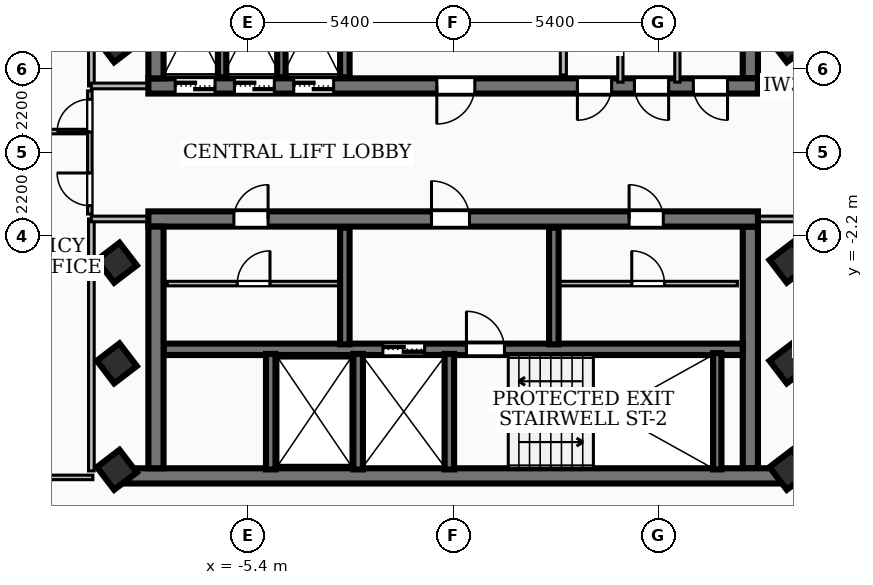
"""IFC4 building model, lengths in metres.
Left out: names, types, materials, properties, quantities, classifications, styles, units other than length and angle.
Written with IfcOpenShell. Run it as: python <this file> out.ifc"""

import sys

from ifc_helpers import new_model, si_unit, direction, frame, frame_2d, origin, origin_2d, place, context, subcontext, project, spatial, rectangle, extrude, element, fill, save


model = new_model("IFC4")
c1 = context("Model", 3, precision=1e-05, world=origin(), true_north=direction((0.0, 1.0)))
c2 = subcontext(c1, "Body", "Model", "MODEL_VIEW")
j1 = project(units=[si_unit("LENGTHUNIT", "METRE"), si_unit("PLANEANGLEUNIT", "RADIAN")], contexts=[c1])
p1 = place(None, origin())
s1 = spatial("IfcSite", under=j1, at=p1, CompositionType="ELEMENT")
p2 = place(p1, origin())
s2 = spatial("IfcBuilding", under=s1, at=p2, CompositionType="ELEMENT")
p3 = place(p2, frame((0.0, 0.0, 229.14)))
s3 = spatial("IfcBuildingStorey", under=s2, at=p3, CompositionType="ELEMENT", Elevation=229.14)
p4 = place(p3, frame((8.02, 1.75, 0.0), z_axis=(0.0, 0.0, 1.0), x_axis=(-1.0, 0.0, 0.0)))
e1 = element("IfcWall", 1, at=p4, inside=s3, PredefinedType="SHEAR", context=c2, shape_type="SweptSolid", body=[
    extrude(rectangle(XDim=16.04, YDim=0.4, at=frame_2d((8.02, 0.0))), origin(), (0.0, 0.0, 1.0), 3.14),
])
p5 = place(p4, frame((7.45, 0.0, 0.0)))
e2 = element("IfcOpeningElement", 2, at=p5, cuts=e1, PredefinedType="OPENING", context=c2, shape_type="SweptSolid", body=[
    extrude(rectangle(XDim=1.0, YDim=2.1, at=frame_2d((0.5, 1.05))), frame((0.0, 0.21, 0.0), z_axis=(0.0, -1.0, 0.0), x_axis=(1.0, 0.0, 0.0)), (0.0, 0.0, 1.0), 0.42),
])
p6 = place(p4, frame((14.285, 0.0, 0.0)))
e3 = element("IfcOpeningElement", 3, at=p6, cuts=e1, PredefinedType="OPENING", context=c2, shape_type="SweptSolid", body=[
    extrude(rectangle(XDim=1.05, YDim=2.15, at=frame_2d((0.525, 1.075))), frame((0.0, 0.21, 0.0), z_axis=(0.0, -1.0, 0.0), x_axis=(1.0, 0.0, 0.0)), (0.0, 0.0, 1.0), 0.42),
])
p7 = place(p4, frame((12.725, 0.0, 0.0)))
e4 = element("IfcOpeningElement", 4, at=p7, cuts=e1, PredefinedType="OPENING", context=c2, shape_type="SweptSolid", body=[
    extrude(rectangle(XDim=1.05, YDim=2.15, at=frame_2d((0.525, 1.075))), frame((0.0, 0.21, 0.0), z_axis=(0.0, -1.0, 0.0), x_axis=(1.0, 0.0, 0.0)), (0.0, 0.0, 1.0), 0.42),
])
p8 = place(p4, frame((11.165, 0.0, 0.0)))
e5 = element("IfcOpeningElement", 5, at=p8, cuts=e1, PredefinedType="OPENING", context=c2, shape_type="SweptSolid", body=[
    extrude(rectangle(XDim=1.05, YDim=2.15, at=frame_2d((0.525, 1.075))), frame((0.0, 0.21, 0.0), z_axis=(0.0, -1.0, 0.0), x_axis=(1.0, 0.0, 0.0)), (0.0, 0.0, 1.0), 0.42),
])
p9 = place(p4, frame((3.85, 0.0, 0.0)))
e6 = element("IfcOpeningElement", 6, at=p9, cuts=e1, PredefinedType="OPENING", context=c2, shape_type="SweptSolid", body=[
    extrude(rectangle(XDim=0.9, YDim=2.06, at=frame_2d((0.45, 1.03))), frame((0.0, 0.21, 0.0), z_axis=(0.0, -1.0, 0.0), x_axis=(1.0, 0.0, 0.0)), (0.0, 0.0, 1.0), 0.42),
])
p10 = place(p4, frame((2.35, 0.0, 0.0)))
e7 = element("IfcOpeningElement", 7, at=p10, cuts=e1, PredefinedType="OPENING", context=c2, shape_type="SweptSolid", body=[
    extrude(rectangle(XDim=0.9, YDim=2.06, at=frame_2d((0.45, 1.03))), frame((0.0, 0.21, 0.0), z_axis=(0.0, -1.0, 0.0), x_axis=(1.0, 0.0, 0.0)), (0.0, 0.0, 1.0), 0.42),
])
p11 = place(p4, frame((0.8, 0.0, 0.0)))
e8 = element("IfcOpeningElement", 8, at=p11, cuts=e1, PredefinedType="OPENING", context=c2, shape_type="SweptSolid", body=[
    extrude(rectangle(XDim=0.9, YDim=2.06, at=frame_2d((0.45, 1.03))), frame((0.0, 0.21, 0.0), z_axis=(0.0, -1.0, 0.0), x_axis=(1.0, 0.0, 0.0)), (0.0, 0.0, 1.0), 0.42),
])
for number, where, z_axis, x_axis in (
    (9, (-7.82, 1.95, 0.0), (0.0, 0.0, 1.0), (0.0, 1.0, 0.0)),
    (10, (7.82, 8.31, 0.0), (0.0, 0.0, 1.0), (0.0, -1.0, 0.0)),
):
    element("IfcWall", number, at=place(p3, frame(where, z_axis=z_axis, x_axis=x_axis)), inside=s3, PredefinedType="SHEAR", context=c2, shape_type="SweptSolid", body=[
        extrude(rectangle(XDim=6.36, YDim=0.4, at=frame_2d((3.18, 0.0))), origin(), (0.0, 0.0, 1.0), 3.14),
    ])
p12 = place(p3, frame((8.78, -8.51, 0.0), z_axis=(0.0, 0.0, 1.0), x_axis=(-1.0, 0.0, 0.0)))
e11 = element("IfcWall", 11, at=p12, inside=s3, PredefinedType="SHEAR", context=c2, shape_type="SweptSolid", body=[
    extrude(rectangle(XDim=17.56, YDim=0.4, at=frame_2d((8.78, 0.0))), origin(), (0.0, 0.0, 1.0), 3.14),
])
p13 = place(p3, frame((-8.02, -1.75, 0.0), z_axis=(0.0, 0.0, 1.0), x_axis=(1.0, 0.0, 0.0)))
e12 = element("IfcWall", 12, at=p13, inside=s3, PredefinedType="SHEAR", context=c2, shape_type="SweptSolid", body=[
    extrude(rectangle(XDim=16.04, YDim=0.4, at=frame_2d((8.02, 0.0))), origin(), (0.0, 0.0, 1.0), 3.14),
])
p14 = place(p13, frame((7.45, 0.0, 0.0)))
e13 = element("IfcOpeningElement", 13, at=p14, cuts=e12, PredefinedType="OPENING", context=c2, shape_type="SweptSolid", body=[
    extrude(rectangle(XDim=1.0, YDim=2.1, at=frame_2d((0.5, 1.05))), frame((0.0, 0.21, 0.0), z_axis=(0.0, -1.0, 0.0), x_axis=(1.0, 0.0, 0.0)), (0.0, 0.0, 1.0), 0.42),
])
p15 = place(p13, frame((12.65, 0.0, 0.0)))
e14 = element("IfcOpeningElement", 14, at=p15, cuts=e12, PredefinedType="OPENING", context=c2, shape_type="SweptSolid", body=[
    extrude(rectangle(XDim=0.9, YDim=2.06, at=frame_2d((0.45, 1.03))), frame((0.0, 0.21, 0.0), z_axis=(0.0, -1.0, 0.0), x_axis=(1.0, 0.0, 0.0)), (0.0, 0.0, 1.0), 0.42),
])
p16 = place(p13, frame((2.25, 0.0, 0.0)))
e15 = element("IfcOpeningElement", 15, at=p16, cuts=e12, PredefinedType="OPENING", context=c2, shape_type="SweptSolid", body=[
    extrude(rectangle(XDim=0.9, YDim=2.06, at=frame_2d((0.45, 1.03))), frame((0.0, 0.21, 0.0), z_axis=(0.0, -1.0, 0.0), x_axis=(1.0, 0.0, 0.0)), (0.0, 0.0, 1.0), 0.42),
])
for number, where, z_axis, x_axis in (
    (16, (-7.82, -8.31, 0.0), (0.0, 0.0, 1.0), (0.0, 1.0, 0.0)),
    (17, (7.82, -1.95, 0.0), (0.0, 0.0, 1.0), (0.0, -1.0, 0.0)),
):
    element("IfcWall", number, at=place(p3, frame(where, z_axis=z_axis, x_axis=x_axis)), inside=s3, PredefinedType="SHEAR", context=c2, shape_type="SweptSolid", body=[
        extrude(rectangle(XDim=6.36, YDim=0.4, at=frame_2d((3.18, 0.0))), origin(), (0.0, 0.0, 1.0), 3.14),
    ])
p17 = place(p3, frame((-7.62, -5.18, 0.0), z_axis=(0.0, 0.0, 1.0), x_axis=(1.0, 0.0, 0.0)))
e18 = element("IfcWall", 18, at=p17, inside=s3, PredefinedType="SOLIDWALL", context=c2, shape_type="SweptSolid", body=[
    extrude(rectangle(XDim=15.24, YDim=0.3, at=frame_2d((7.62, 0.0))), origin(), (0.0, 0.0, 1.0), 3.14),
])
p18 = place(p17, frame((5.77, 0.0, 0.0)))
e19 = element("IfcOpeningElement", 19, at=p18, cuts=e18, PredefinedType="OPENING", context=c2, shape_type="SweptSolid", body=[
    extrude(rectangle(XDim=1.1, YDim=2.15, at=frame_2d((0.55, 1.075))), frame((0.0, 0.16, 0.0), z_axis=(0.0, -1.0, 0.0), x_axis=(1.0, 0.0, 0.0)), (0.0, 0.0, 1.0), 0.32),
])
p19 = place(p17, frame((7.97, 0.0, 0.0)))
e20 = element("IfcOpeningElement", 20, at=p19, cuts=e18, PredefinedType="OPENING", context=c2, shape_type="SweptSolid", body=[
    extrude(rectangle(XDim=1.0, YDim=2.1, at=frame_2d((0.5, 1.05))), frame((0.0, 0.16, 0.0), z_axis=(0.0, -1.0, 0.0), x_axis=(1.0, 0.0, 0.0)), (0.0, 0.0, 1.0), 0.32),
])
p20 = place(p3, frame((6.95, -8.34, 0.0), z_axis=(0.0, 0.0, 1.0), x_axis=(0.0, 1.0, 0.0)))
e21 = element("IfcWall", 21, at=p20, inside=s3, PredefinedType="SOLIDWALL", context=c2, shape_type="SweptSolid", body=[
    extrude(rectangle(XDim=3.06, YDim=0.22, at=frame_2d((1.53, 0.0))), origin(), (0.0, 0.0, 1.0), 3.14),
])
p21 = place(p3, frame((-2.85, 1.98, 0.0), z_axis=(0.0, 0.0, 1.0), x_axis=(0.0, 1.0, 0.0)))
e22 = element("IfcWall", 22, at=p21, inside=s3, PredefinedType="SOLIDWALL", context=c2, shape_type="SweptSolid", body=[
    extrude(rectangle(XDim=3.07, YDim=0.25, at=frame_2d((1.535, 0.0))), origin(), (0.0, 0.0, 1.0), 3.14),
])
for number, where, z_axis, x_axis in (
    (23, (-0.1, -8.34, 0.0), (0.0, 0.0, 1.0), (0.0, 1.0, 0.0)),
    (24, (-2.5, -8.34, 0.0), (0.0, 0.0, 1.0), (0.0, 1.0, 0.0)),
    (25, (-4.8, -8.34, 0.0), (0.0, 0.0, 1.0), (0.0, 1.0, 0.0)),
):
    element("IfcWall", number, at=place(p3, frame(where, z_axis=z_axis, x_axis=x_axis)), inside=s3, PredefinedType="SOLIDWALL", context=c2, shape_type="SweptSolid", body=[
        extrude(rectangle(XDim=3.04, YDim=0.25, at=frame_2d((1.52, 0.0))), origin(), (0.0, 0.0, 1.0), 3.14),
    ])
for number, where, z_axis, x_axis in (
    (26, (-2.85, -5.05, 0.0), (0.0, 0.0, 1.0), (0.0, 1.0, 0.0)),
    (27, (2.65, -5.05, 0.0), (0.0, 0.0, 1.0), (0.0, 1.0, 0.0)),
):
    element("IfcWall", number, at=place(p3, frame(where, z_axis=z_axis, x_axis=x_axis)), inside=s3, PredefinedType="SOLIDWALL", context=c2, shape_type="SweptSolid", body=[
        extrude(rectangle(XDim=3.07, YDim=0.25, at=frame_2d((1.535, 0.0))), origin(), (0.0, 0.0, 1.0), 3.14),
    ])
for number, where, z_axis, x_axis in (
    (28, (-6.08, 1.98, 0.0), (0.0, 0.0, 1.0), (0.0, 1.0, 0.0)),
    (29, (-4.52, 1.98, 0.0), (0.0, 0.0, 1.0), (0.0, 1.0, 0.0)),
):
    element("IfcWall", number, at=place(p3, frame(where, z_axis=z_axis, x_axis=x_axis)), inside=s3, PredefinedType="SOLIDWALL", context=c2, shape_type="SweptSolid", body=[
        extrude(rectangle(XDim=3.07, YDim=0.22, at=frame_2d((1.535, 0.0))), origin(), (0.0, 0.0, 1.0), 3.14),
    ])
for number, where, z_axis, x_axis in (
    (30, (-8.85, -5.55, 0.0), (0.0, 0.0, 1.0), (0.794, 0.607, 0.0)),
    (31, (-8.85, -2.9, 0.0), (0.0, 0.0, 1.0), (0.794, 0.607, 0.0)),
    (32, (-8.85, 2.9, 0.0), (0.0, 0.0, 1.0), (0.794, 0.607, 0.0)),
    (33, (8.85, -5.55, 0.0), (0.0, 0.0, 1.0), (0.794, 0.607, 0.0)),
    (34, (8.85, -2.9, 0.0), (0.0, 0.0, 1.0), (0.794, 0.607, 0.0)),
    (35, (8.85, 2.9, 0.0), (0.0, 0.0, 1.0), (0.794, 0.607, 0.0)),
    (36, (8.85, -8.35, 0.0), (0.0, 0.0, 1.0), (0.794, 0.607, 0.0)),
    (37, (-8.85, -8.35, 0.0), (0.0, 0.0, 1.0), (0.794, 0.607, 0.0)),
):
    element("IfcColumn", number, at=place(p3, frame(where, z_axis=z_axis, x_axis=x_axis)), inside=s3, PredefinedType="COLUMN", context=c2, shape_type="SweptSolid", body=[
        extrude(rectangle(XDim=0.75, YDim=0.75, at=origin_2d()), origin(), (0.0, 0.0, 1.0), 3.42),
    ])
p22 = place(p3, frame((2.9, 2.04, 0.0), z_axis=(0.0, 0.0, 1.0), x_axis=(0.0, 1.0, 0.0)))
e38 = element("IfcWall", 38, at=p22, inside=s3, PredefinedType="PARTITIONING", context=c2, shape_type="SweptSolid", body=[
    extrude(rectangle(XDim=2.94, YDim=0.16, at=frame_2d((1.47, 0.0))), origin(), (0.0, 0.0, 1.0), 2.37),
])
p23 = place(p22, frame((1.82, 0.0, 0.0)))
e39 = element("IfcOpeningElement", 39, at=p23, cuts=e38, PredefinedType="OPENING", context=c2, shape_type="SweptSolid", body=[
    extrude(rectangle(XDim=0.9, YDim=2.06, at=frame_2d((0.45, 1.03))), frame((0.0, 0.09, 0.0), z_axis=(0.0, -1.0, 0.0), x_axis=(1.0, 0.0, 0.0)), (0.0, 0.0, 1.0), 0.18),
])
p24 = place(p3, frame((2.8, -3.45, 0.0), z_axis=(0.0, 0.0, 1.0), x_axis=(1.0, 0.0, 0.0)))
e40 = element("IfcWall", 40, at=p24, inside=s3, PredefinedType="PARTITIONING", context=c2, shape_type="SweptSolid", body=[
    extrude(rectangle(XDim=4.68, YDim=0.12, at=frame_2d((2.34, 0.0))), origin(), (0.0, 0.0, 1.0), 3.14),
])
p25 = place(p24, frame((1.9, 0.0, 0.0)))
e41 = element("IfcOpeningElement", 41, at=p25, cuts=e40, PredefinedType="OPENING", context=c2, shape_type="SweptSolid", body=[
    extrude(rectangle(XDim=0.86, YDim=2.04, at=frame_2d((0.43, 1.02))), frame((0.0, 0.07, 0.0), z_axis=(0.0, -1.0, 0.0), x_axis=(1.0, 0.0, 0.0)), (0.0, 0.0, 1.0), 0.14),
])
p26 = place(p3, frame((-7.52, -3.45, 0.0), z_axis=(0.0, 0.0, 1.0), x_axis=(1.0, 0.0, 0.0)))
e42 = element("IfcWall", 42, at=p26, inside=s3, PredefinedType="PARTITIONING", context=c2, shape_type="SweptSolid", body=[
    extrude(rectangle(XDim=4.54, YDim=0.12, at=frame_2d((2.27, 0.0))), origin(), (0.0, 0.0, 1.0), 3.14),
])
p27 = place(p26, frame((1.84, 0.0, 0.0)))
e43 = element("IfcOpeningElement", 43, at=p27, cuts=e42, PredefinedType="OPENING", context=c2, shape_type="SweptSolid", body=[
    extrude(rectangle(XDim=0.86, YDim=2.04, at=frame_2d((0.43, 1.02))), frame((0.0, 0.07, 0.0), z_axis=(0.0, -1.0, 0.0), x_axis=(1.0, 0.0, 0.0)), (0.0, 0.0, 1.0), 0.14),
])
for number, where, z_axis, x_axis in (
    (44, (4.4, 1.85, 0.0), (0.0, 0.0, 1.0), (0.0, 1.0, 0.0)),
    (45, (5.9, 1.85, 0.0), (0.0, 0.0, 1.0), (0.0, 1.0, 0.0)),
):
    element("IfcWall", number, at=place(p3, frame(where, z_axis=z_axis, x_axis=x_axis)), inside=s3, PredefinedType="PARTITIONING", context=c2, shape_type="SweptSolid", body=[
        extrude(rectangle(XDim=1.89, YDim=0.138, at=frame_2d((0.945, 0.0))), origin(), (0.0, 0.0, 1.0), 2.37),
    ])
p28 = place(p3, frame((-9.52, 1.75, 0.0), z_axis=(0.0, 0.0, 1.0), x_axis=(0.0, 1.0, 0.0)))
e46 = element("IfcWall", 46, at=p28, inside=s3, PredefinedType="PARTITIONING", context=c2, shape_type="SweptSolid", body=[
    extrude(rectangle(XDim=6.63, YDim=0.15, at=frame_2d((3.315, 0.0))), origin(), (0.0, 0.0, 1.0), 3.14),
])
p29 = place(p3, frame((-7.85, 1.75, 0.0), z_axis=(0.0, 0.0, 1.0), x_axis=(-1.0, 0.0, 0.0)))
e47 = element("IfcWall", 47, at=p29, inside=s3, PredefinedType="PARTITIONING", context=c2, shape_type="SweptSolid", body=[
    extrude(rectangle(XDim=1.67, YDim=0.15, at=frame_2d((0.835, 0.0))), origin(), (0.0, 0.0, 1.0), 2.37),
])
p30 = place(p3, frame((-9.52, -8.38, 0.0), z_axis=(0.0, 0.0, 1.0), x_axis=(0.0, 1.0, 0.0)))
e48 = element("IfcWall", 48, at=p30, inside=s3, PredefinedType="PARTITIONING", context=c2, shape_type="SweptSolid", body=[
    extrude(rectangle(XDim=6.63, YDim=0.15, at=frame_2d((3.315, 0.0))), origin(), (0.0, 0.0, 1.0), 3.14),
])
for number, where, z_axis, x_axis in (
    (49, (-7.85, -1.75, 0.0), (0.0, 0.0, 1.0), (-1.0, 0.0, 0.0)),
    (50, (7.85, 1.75, 0.0), (0.0, 0.0, 1.0), (1.0, 0.0, 0.0)),
    (51, (7.85, -1.75, 0.0), (0.0, 0.0, 1.0), (1.0, 0.0, 0.0)),
):
    element("IfcWall", number, at=place(p3, frame(where, z_axis=z_axis, x_axis=x_axis)), inside=s3, PredefinedType="PARTITIONING", context=c2, shape_type="SweptSolid", body=[
        extrude(rectangle(XDim=1.67, YDim=0.15, at=frame_2d((0.835, 0.0))), origin(), (0.0, 0.0, 1.0), 2.37),
    ])
p31 = place(p3, frame((-18.528, 0.55, 0.0), z_axis=(0.0, 0.0, 1.0), x_axis=(1.0, 0.0, 0.0)))
e52 = element("IfcWall", 52, at=p31, inside=s3, PredefinedType="PARTITIONING", context=c2, shape_type="SweptSolid", body=[
    extrude(rectangle(XDim=8.868, YDim=0.12, at=frame_2d((4.434, 0.0))), origin(), (0.0, 0.0, 1.0), 3.14),
])
p32 = place(p3, frame((-11.571, -8.55, 0.0), z_axis=(0.0, 0.0, 1.0), x_axis=(1.0, 0.0, 0.0)))
e53 = element("IfcWall", 53, at=p32, inside=s3, PredefinedType="PARTITIONING", context=c2, shape_type="SweptSolid", body=[
    extrude(rectangle(XDim=2.091, YDim=0.12, at=frame_2d((1.045, 0.0))), origin(), (0.0, 0.0, 1.0), 3.14),
])
p33 = place(p3, frame((-9.56, -1.62, 0.0), z_axis=(0.0, 0.0, 1.0), x_axis=(0.0, 1.0, 0.0)))
e54 = element("IfcWall", 54, at=p33, inside=s3, PredefinedType="PARTITIONING", context=c2, shape_type="SweptSolid", body=[
    extrude(rectangle(XDim=3.24, YDim=0.12, at=frame_2d((1.62, 0.0))), origin(), (0.0, 0.0, 1.0), 3.14),
])
p34 = place(p33, frame((0.22, 0.0, 0.0)))
e55 = element("IfcOpeningElement", 55, at=p34, cuts=e54, PredefinedType="OPENING", context=c2, shape_type="SweptSolid", body=[
    extrude(rectangle(XDim=0.86, YDim=2.04, at=frame_2d((0.43, 1.02))), frame((0.0, 0.07, 0.0), z_axis=(0.0, -1.0, 0.0), x_axis=(1.0, 0.0, 0.0)), (0.0, 0.0, 1.0), 0.14),
])
p35 = place(p33, frame((2.16, 0.0, 0.0)))
e56 = element("IfcOpeningElement", 56, at=p35, cuts=e54, PredefinedType="OPENING", context=c2, shape_type="SweptSolid", body=[
    extrude(rectangle(XDim=0.86, YDim=2.04, at=frame_2d((0.43, 1.02))), frame((0.0, 0.07, 0.0), z_axis=(0.0, -1.0, 0.0), x_axis=(1.0, 0.0, 0.0)), (0.0, 0.0, 1.0), 0.14),
])
p36 = place(p3, frame((17.068, -4.939, 0.0), z_axis=(0.0, 0.0, 1.0), x_axis=(-0.794433927634, -0.607350586255, 0.0)))
e57 = element("IfcWall", 57, at=p36, inside=s3, PredefinedType="PARTITIONING", context=c2, shape_type="SweptSolid", body=[
    extrude(rectangle(XDim=20.58, YDim=0.12, at=frame_2d((10.29, 0.0))), origin(), (0.0, 0.0, 1.0), 2.51),
])
p37 = place(p36, frame((9.96, 0.0, 0.0)))
e58 = element("IfcOpeningElement", 58, at=p37, cuts=e57, PredefinedType="OPENING", context=c2, shape_type="SweptSolid", body=[
    extrude(rectangle(XDim=1.2, YDim=2.1, at=frame_2d((0.6, 1.05))), frame((0.0, 0.07, 0.0), z_axis=(0.0, -1.0, 0.0), x_axis=(1.0, 0.0, 0.0)), (0.0, 0.0, 1.0), 0.14),
])
p38 = place(p5, origin())
e59 = element("IfcDoor", 59, at=p38, inside=s3, OperationType="SINGLE_SWING_RIGHT", PredefinedType="DOOR", context=c2, shape_type="SweptSolid", body=[
    extrude(rectangle(XDim=1.0, YDim=2.1, at=frame_2d((0.5, 1.05))), frame((0.0, 0.025, 0.0), z_axis=(0.0, -1.0, 0.0), x_axis=(1.0, 0.0, 0.0)), (0.0, 0.0, 1.0), 0.05),
])
fill(e2, e59)
p39 = place(p14, origin())
e60 = element("IfcDoor", 60, at=p39, inside=s3, OperationType="SINGLE_SWING_LEFT", PredefinedType="DOOR", context=c2, shape_type="SweptSolid", body=[
    extrude(rectangle(XDim=1.0, YDim=2.1, at=frame_2d((0.5, 1.05))), frame((0.0, 0.025, 0.0), z_axis=(0.0, -1.0, 0.0), x_axis=(1.0, 0.0, 0.0)), (0.0, 0.0, 1.0), 0.05),
])
fill(e13, e60)
p40 = place(p18, origin())
e61 = element("IfcDoor", 61, at=p40, inside=s3, OperationType="DOUBLE_DOOR_SLIDING", PredefinedType="DOOR", context=c2, shape_type="SweptSolid", body=[
    extrude(rectangle(XDim=1.1, YDim=2.15, at=frame_2d((0.55, 1.075))), frame((0.0, 0.025, 0.0), z_axis=(0.0, -1.0, 0.0), x_axis=(1.0, 0.0, 0.0)), (0.0, 0.0, 1.0), 0.05),
])
fill(e19, e61)
p41 = place(p19, origin())
e62 = element("IfcDoor", 62, at=p41, inside=s3, OperationType="SINGLE_SWING_LEFT", PredefinedType="DOOR", context=c2, shape_type="SweptSolid", body=[
    extrude(rectangle(XDim=1.0, YDim=2.1, at=frame_2d((0.5, 1.05))), frame((0.0, 0.025, 0.0), z_axis=(0.0, -1.0, 0.0), x_axis=(1.0, 0.0, 0.0)), (0.0, 0.0, 1.0), 0.05),
])
fill(e20, e62)
p42 = place(p6, origin())
e63 = element("IfcDoor", 63, at=p42, inside=s3, OperationType="DOUBLE_DOOR_SLIDING", PredefinedType="DOOR", context=c2, shape_type="SweptSolid", body=[
    extrude(rectangle(XDim=1.05, YDim=2.15, at=frame_2d((0.525, 1.075))), frame((0.0, 0.025, 0.0), z_axis=(0.0, -1.0, 0.0), x_axis=(1.0, 0.0, 0.0)), (0.0, 0.0, 1.0), 0.05),
])
fill(e3, e63)
p43 = place(p7, origin())
e64 = element("IfcDoor", 64, at=p43, inside=s3, OperationType="DOUBLE_DOOR_SLIDING", PredefinedType="DOOR", context=c2, shape_type="SweptSolid", body=[
    extrude(rectangle(XDim=1.05, YDim=2.15, at=frame_2d((0.525, 1.075))), frame((0.0, 0.025, 0.0), z_axis=(0.0, -1.0, 0.0), x_axis=(1.0, 0.0, 0.0)), (0.0, 0.0, 1.0), 0.05),
])
fill(e4, e64)
p44 = place(p8, origin())
e65 = element("IfcDoor", 65, at=p44, inside=s3, OperationType="DOUBLE_DOOR_SLIDING", PredefinedType="DOOR", context=c2, shape_type="SweptSolid", body=[
    extrude(rectangle(XDim=1.05, YDim=2.15, at=frame_2d((0.525, 1.075))), frame((0.0, 0.025, 0.0), z_axis=(0.0, -1.0, 0.0), x_axis=(1.0, 0.0, 0.0)), (0.0, 0.0, 1.0), 0.05),
])
fill(e5, e65)
p45 = place(p15, origin())
e66 = element("IfcDoor", 66, at=p45, inside=s3, OperationType="SINGLE_SWING_LEFT", PredefinedType="DOOR", context=c2, shape_type="SweptSolid", body=[
    extrude(rectangle(XDim=0.9, YDim=2.06, at=frame_2d((0.45, 1.03))), frame((0.0, 0.025, 0.0), z_axis=(0.0, -1.0, 0.0), x_axis=(1.0, 0.0, 0.0)), (0.0, 0.0, 1.0), 0.05),
])
fill(e14, e66)
p46 = place(p16, origin())
e67 = element("IfcDoor", 67, at=p46, inside=s3, OperationType="SINGLE_SWING_RIGHT", PredefinedType="DOOR", context=c2, shape_type="SweptSolid", body=[
    extrude(rectangle(XDim=0.9, YDim=2.06, at=frame_2d((0.45, 1.03))), frame((0.0, 0.025, 0.0), z_axis=(0.0, -1.0, 0.0), x_axis=(1.0, 0.0, 0.0)), (0.0, 0.0, 1.0), 0.05),
])
fill(e15, e67)
p47 = place(p9, origin())
e68 = element("IfcDoor", 68, at=p47, inside=s3, OperationType="SINGLE_SWING_RIGHT", PredefinedType="DOOR", context=c2, shape_type="SweptSolid", body=[
    extrude(rectangle(XDim=0.9, YDim=2.06, at=frame_2d((0.45, 1.03))), frame((0.0, 0.025, 0.0), z_axis=(0.0, -1.0, 0.0), x_axis=(1.0, 0.0, 0.0)), (0.0, 0.0, 1.0), 0.05),
])
fill(e6, e68)
p48 = place(p10, origin())
e69 = element("IfcDoor", 69, at=p48, inside=s3, OperationType="SINGLE_SWING_LEFT", PredefinedType="DOOR", context=c2, shape_type="SweptSolid", body=[
    extrude(rectangle(XDim=0.9, YDim=2.06, at=frame_2d((0.45, 1.03))), frame((0.0, 0.025, 0.0), z_axis=(0.0, -1.0, 0.0), x_axis=(1.0, 0.0, 0.0)), (0.0, 0.0, 1.0), 0.05),
])
fill(e7, e69)
p49 = place(p11, origin())
e70 = element("IfcDoor", 70, at=p49, inside=s3, OperationType="SINGLE_SWING_LEFT", PredefinedType="DOOR", context=c2, shape_type="SweptSolid", body=[
    extrude(rectangle(XDim=0.9, YDim=2.06, at=frame_2d((0.45, 1.03))), frame((0.0, 0.025, 0.0), z_axis=(0.0, -1.0, 0.0), x_axis=(1.0, 0.0, 0.0)), (0.0, 0.0, 1.0), 0.05),
])
fill(e8, e70)
p50 = place(p25, origin())
e71 = element("IfcDoor", 71, at=p50, inside=s3, OperationType="SINGLE_SWING_LEFT", PredefinedType="DOOR", context=c2, shape_type="SweptSolid", body=[
    extrude(rectangle(XDim=0.86, YDim=2.04, at=frame_2d((0.43, 1.02))), frame((0.0, 0.025, 0.0), z_axis=(0.0, -1.0, 0.0), x_axis=(1.0, 0.0, 0.0)), (0.0, 0.0, 1.0), 0.05),
])
fill(e41, e71)
p51 = place(p27, origin())
e72 = element("IfcDoor", 72, at=p51, inside=s3, OperationType="SINGLE_SWING_RIGHT", PredefinedType="DOOR", context=c2, shape_type="SweptSolid", body=[
    extrude(rectangle(XDim=0.86, YDim=2.04, at=frame_2d((0.43, 1.02))), frame((0.0, 0.025, 0.0), z_axis=(0.0, -1.0, 0.0), x_axis=(1.0, 0.0, 0.0)), (0.0, 0.0, 1.0), 0.05),
])
fill(e43, e72)
p52 = place(p34, origin())
e73 = element("IfcDoor", 73, at=p52, inside=s3, OperationType="SINGLE_SWING_RIGHT", PredefinedType="DOOR", context=c2, shape_type="SweptSolid", body=[
    extrude(rectangle(XDim=0.86, YDim=2.04, at=frame_2d((0.43, 1.02))), frame((0.0, 0.025, 0.0), z_axis=(0.0, -1.0, 0.0), x_axis=(1.0, 0.0, 0.0)), (0.0, 0.0, 1.0), 0.05),
])
fill(e55, e73)
p53 = place(p35, origin())
e74 = element("IfcDoor", 74, at=p53, inside=s3, OperationType="SINGLE_SWING_LEFT", PredefinedType="DOOR", context=c2, shape_type="SweptSolid", body=[
    extrude(rectangle(XDim=0.86, YDim=2.04, at=frame_2d((0.43, 1.02))), frame((0.0, 0.025, 0.0), z_axis=(0.0, -1.0, 0.0), x_axis=(1.0, 0.0, 0.0)), (0.0, 0.0, 1.0), 0.05),
])
fill(e56, e74)
save(model, sys.argv[1])
